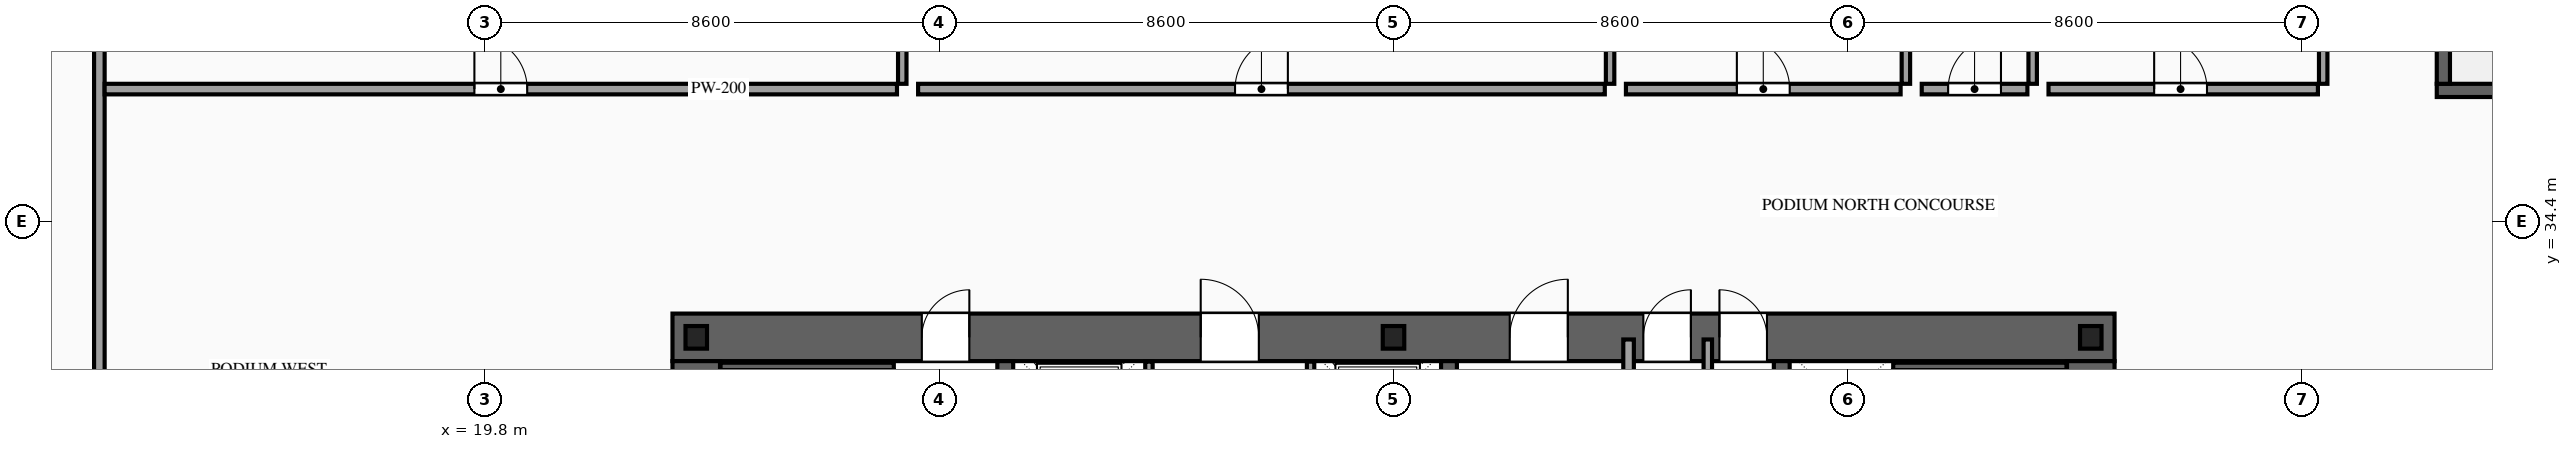
"""IFC4 building model, lengths in metres.
Left out: names, types, materials, properties, quantities, classifications, styles, units other than length and angle.
Written with IfcOpenShell. Run it as: python <this file> out.ifc"""

import sys

from ifc_helpers import new_model, si_unit, direction, frame, frame_2d, origin, origin_2d, place, context, subcontext, project, spatial, rectangle, i_section, extrude, source, transform, mapped, element, fill, save


model = new_model("IFC4")
c1 = context("Model", 3, precision=1e-05, world=origin(), true_north=direction((0.0, 1.0)))
c2 = subcontext(c1, "Body", "Model", "MODEL_VIEW")
j1 = project(units=[si_unit("LENGTHUNIT", "METRE"), si_unit("PLANEANGLEUNIT", "RADIAN")], contexts=[c1])
p1 = place(None, origin())
s1 = spatial("IfcSite", under=j1, at=p1, CompositionType="ELEMENT")
p2 = place(p1, origin())
s2 = spatial("IfcBuilding", under=s1, at=p2, CompositionType="ELEMENT")
p3 = place(p2, frame((0.0, 0.0, 5.4)))
s3 = spatial("IfcBuildingStorey", under=s2, at=p3, CompositionType="ELEMENT", Elevation=5.4)
p4 = place(p3, frame((23.35, 32.2, 0.0), z_axis=(0.0, 0.0, 1.0), x_axis=(1.0, 0.0, 0.0)))
e1 = element("IfcWall", 1, at=p4, inside=s3, PredefinedType="SHEAR", context=c2, shape_type="SweptSolid", body=[
    extrude(rectangle(XDim=27.3, YDim=0.9, at=frame_2d((13.65, 0.0))), origin(), (0.0, 0.0, 1.0), 4.8),
])
p5 = place(p4, frame((4.72, 0.0, 0.0)))
e2 = element("IfcOpeningElement", 2, at=p5, cuts=e1, PredefinedType="OPENING", context=c2, shape_type="SweptSolid", body=[
    extrude(rectangle(XDim=0.9, YDim=2.15, at=frame_2d((0.45, 1.075))), frame((0.0, 0.465, 0.0), z_axis=(0.0, -1.0, 0.0), x_axis=(1.0, 0.0, 0.0)), (0.0, 0.0, 1.0), 0.93),
])
p6 = place(p4, frame((10.0, 0.0, 0.0)))
e3 = element("IfcOpeningElement", 3, at=p6, cuts=e1, PredefinedType="OPENING", context=c2, shape_type="SweptSolid", body=[
    extrude(rectangle(XDim=1.1, YDim=2.2, at=frame_2d((0.55, 1.1))), frame((0.0, 0.465, 0.0), z_axis=(0.0, -1.0, 0.0), x_axis=(1.0, 0.0, 0.0)), (0.0, 0.0, 1.0), 0.93),
])
p7 = place(p4, frame((15.85, 0.0, 0.0)))
e4 = element("IfcOpeningElement", 4, at=p7, cuts=e1, PredefinedType="OPENING", context=c2, shape_type="SweptSolid", body=[
    extrude(rectangle(XDim=1.1, YDim=2.2, at=frame_2d((0.55, 1.1))), frame((0.0, 0.465, 0.0), z_axis=(0.0, -1.0, 0.0), x_axis=(1.0, 0.0, 0.0)), (0.0, 0.0, 1.0), 0.93),
])
p8 = place(p4, frame((18.38, 0.0, 0.0)))
e5 = element("IfcOpeningElement", 5, at=p8, cuts=e1, PredefinedType="OPENING", context=c2, shape_type="SweptSolid", body=[
    extrude(rectangle(XDim=0.9, YDim=2.15, at=frame_2d((0.45, 1.075))), frame((0.0, 0.465, 0.0), z_axis=(0.0, -1.0, 0.0), x_axis=(1.0, 0.0, 0.0)), (0.0, 0.0, 1.0), 0.93),
])
p9 = place(p4, frame((19.82, 0.0, 0.0)))
e6 = element("IfcOpeningElement", 6, at=p9, cuts=e1, PredefinedType="OPENING", context=c2, shape_type="SweptSolid", body=[
    extrude(rectangle(XDim=0.9, YDim=2.15, at=frame_2d((0.45, 1.075))), frame((0.0, 0.465, 0.0), z_axis=(0.0, -1.0, 0.0), x_axis=(1.0, 0.0, 0.0)), (0.0, 0.0, 1.0), 0.93),
])
m1 = source(origin(), c2, "Body", "SweptSolid", [
    extrude(rectangle(XDim=11.9, YDim=0.9, at=frame_2d((5.95, 0.0))), origin(), (0.0, 0.0, 1.0), 4.8),
])
for number, where, z_axis, x_axis in (
    (7, (23.8, 19.85, 0.0), (0.0, 0.0, 1.0), (0.0, 1.0, 0.0)),
    (8, (50.2, 19.85, 0.0), (0.0, 0.0, 1.0), (0.0, 1.0, 0.0)),
):
    element("IfcWall", number, at=place(p3, frame(where, z_axis=z_axis, x_axis=x_axis)), inside=s3, PredefinedType="SHEAR", context=c2, shape_type="MappedRepresentation", body=[
        mapped(m1, transform((0.0, 0.0, 0.0), scale=1.0)),
    ])
m2 = source(origin(), c2, "Body", "SweptSolid", [
    extrude(rectangle(XDim=11.9, YDim=0.3, at=frame_2d((5.95, 0.0))), origin(), (0.0, 0.0, 1.0), 4.8),
])
for number, where, z_axis, x_axis in (
    (9, (29.65, 19.85, 0.0), (0.0, 0.0, 1.0), (0.0, 1.0, 0.0)),
    (10, (38.05, 19.85, 0.0), (0.0, 0.0, 1.0), (0.0, 1.0, 0.0)),
    (11, (44.35, 19.85, 0.0), (0.0, 0.0, 1.0), (0.0, 1.0, 0.0)),
):
    element("IfcWall", number, at=place(p3, frame(where, z_axis=z_axis, x_axis=x_axis)), inside=s3, PredefinedType="SOLIDWALL", context=c2, shape_type="MappedRepresentation", body=[
        mapped(m2, transform((0.0, 0.0, 0.0), scale=1.0)),
    ])
m3 = source(origin(), c2, "Body", "SweptSolid", [
    extrude(i_section(OverallWidth=0.407, OverallDepth=0.428, WebThickness=0.02, FlangeThickness=0.035, at=origin_2d()), origin(), (0.0, 0.0, 1.0), 4.8),
])
for number, where, z_axis, x_axis in (
    (12, (23.8, 32.2, 0.0), (0.0, 0.0, 1.0), (1.0, 0.0, 0.0)),
    (13, (37.0, 32.2, 0.0), (0.0, 0.0, 1.0), (1.0, 0.0, 0.0)),
    (14, (50.2, 32.2, 0.0), (0.0, 0.0, 1.0), (1.0, 0.0, 0.0)),
):
    element("IfcColumn", number, at=place(p3, frame(where, z_axis=z_axis, x_axis=x_axis)), inside=s3, PredefinedType="COLUMN", context=c2, shape_type="MappedRepresentation", body=[
        mapped(m3, transform((0.0, 0.0, 0.0), scale=1.0)),
    ])
p10 = place(p3, frame((32.37, 29.4, 0.0), z_axis=(0.0, 0.0, 1.0), x_axis=(0.0, 1.0, 0.0)))
e15 = element("IfcWall", 15, at=p10, inside=s3, PredefinedType="SOLIDWALL", context=c2, shape_type="SweptSolid", body=[
    extrude(rectangle(XDim=2.34, YDim=0.14, at=frame_2d((1.17, 0.0))), origin(), (0.0, 0.0, 1.0), 4.52),
])
p11 = place(p10, frame((0.62, 0.0, 0.0)))
e16 = element("IfcOpeningElement", 16, at=p11, cuts=e15, PredefinedType="OPENING", context=c2, shape_type="SweptSolid", body=[
    extrude(rectangle(XDim=1.1, YDim=2.2, at=frame_2d((0.55, 1.1))), frame((0.0, 0.085, 0.0), z_axis=(0.0, -1.0, 0.0), x_axis=(1.0, 0.0, 0.0)), (0.0, 0.0, 1.0), 0.17),
])
p12 = place(p3, frame((35.43, 29.4, 0.0), z_axis=(0.0, 0.0, 1.0), x_axis=(0.0, 1.0, 0.0)))
e17 = element("IfcWall", 17, at=p12, inside=s3, PredefinedType="SOLIDWALL", context=c2, shape_type="SweptSolid", body=[
    extrude(rectangle(XDim=2.34, YDim=0.14, at=frame_2d((1.17, 0.0))), origin(), (0.0, 0.0, 1.0), 4.52),
])
p13 = place(p12, frame((0.62, 0.0, 0.0)))
e18 = element("IfcOpeningElement", 18, at=p13, cuts=e17, PredefinedType="OPENING", context=c2, shape_type="SweptSolid", body=[
    extrude(rectangle(XDim=1.1, YDim=2.2, at=frame_2d((0.55, 1.1))), frame((0.0, 0.085, 0.0), z_axis=(0.0, -1.0, 0.0), x_axis=(1.0, 0.0, 0.0)), (0.0, 0.0, 1.0), 0.17),
])
m4 = source(origin(), c2, "Body", "SweptSolid", [
    extrude(rectangle(XDim=3.28, YDim=0.14, at=frame_2d((1.64, 0.0))), origin(), (0.0, 0.0, 1.0), 4.52),
])
for number, where, z_axis, x_axis in (
    (19, (24.26, 31.65, 0.0), (0.0, 0.0, 1.0), (1.0, 0.0, 0.0)),
    (20, (46.46, 31.65, 0.0), (0.0, 0.0, 1.0), (1.0, 0.0, 0.0)),
):
    element("IfcWall", number, at=place(p3, frame(where, z_axis=z_axis, x_axis=x_axis)), inside=s3, PredefinedType="SOLIDWALL", context=c2, shape_type="MappedRepresentation", body=[
        mapped(m4, transform((0.0, 0.0, 0.0), scale=1.0)),
    ])
m5 = source(origin(), c2, "Body", "SweptSolid", [
    extrude(rectangle(XDim=4.3, YDim=0.25, at=frame_2d((2.15, 0.0))), origin(), (0.0, 0.0, 1.0), 4.52),
])
p14 = place(p3, frame((56.75, 36.875, 0.0), z_axis=(0.0, 0.0, 1.0), x_axis=(1.0, 0.0, 0.0)))
e21 = element("IfcWall", 21, at=p14, inside=s3, PredefinedType="SOLIDWALL", context=c2, shape_type="MappedRepresentation", body=[
    mapped(m5, transform((0.0, 0.0, 0.0), scale=1.0)),
])
p15 = place(p3, frame((56.875, 37.0, 0.0), z_axis=(0.0, 0.0, 1.0), x_axis=(0.0, 1.0, 0.0)))
e22 = element("IfcWall", 22, at=p15, inside=s3, PredefinedType="SOLIDWALL", context=c2, shape_type="SweptSolid", body=[
    extrude(rectangle(XDim=9.6, YDim=0.25, at=frame_2d((4.8, 0.0))), origin(), (0.0, 0.0, 1.0), 4.52),
])
p16 = place(p15, frame((8.15, 0.0, 0.0)))
e23 = element("IfcOpeningElement", 23, at=p16, cuts=e22, PredefinedType="OPENING", context=c2, shape_type="SweptSolid", body=[
    extrude(rectangle(XDim=1.1, YDim=2.2, at=frame_2d((0.55, 1.1))), frame((0.0, 0.14, 0.0), z_axis=(0.0, -1.0, 0.0), x_axis=(1.0, 0.0, 0.0)), (0.0, 0.0, 1.0), 0.28),
])
m6 = source(origin(), c2, "Body", "SweptSolid", [
    extrude(rectangle(XDim=5.96, YDim=0.2, at=frame_2d((2.98, 0.0))), origin(), (0.0, 0.0, 1.0), 4.52),
])
p17 = place(p3, frame((41.45, 26.2, 0.0), z_axis=(0.0, 0.0, 1.0), x_axis=(0.0, 1.0, 0.0)))
e24 = element("IfcWall", 24, at=p17, inside=s3, PredefinedType="PARTITIONING", context=c2, shape_type="MappedRepresentation", body=[
    mapped(m6, transform((0.0, 0.0, 0.0), scale=1.0)),
])
m7 = source(origin(), c2, "Body", "SweptSolid", [
    extrude(rectangle(XDim=5.96, YDim=0.16, at=frame_2d((2.98, 0.0))), origin(), (0.0, 0.0, 1.0), 4.52),
])
p18 = place(p3, frame((42.95, 26.2, 0.0), z_axis=(0.0, 0.0, 1.0), x_axis=(0.0, 1.0, 0.0)))
e25 = element("IfcWall", 25, at=p18, inside=s3, PredefinedType="PARTITIONING", context=c2, shape_type="MappedRepresentation", body=[
    mapped(m7, transform((0.0, 0.0, 0.0), scale=1.0)),
])
p19 = place(p3, frame((12.5, 24.8, 0.0), z_axis=(0.0, 0.0, 1.0), x_axis=(0.0, 1.0, 0.0)))
e26 = element("IfcWall", 26, at=p19, inside=s3, PredefinedType="PARTITIONING", context=c2, shape_type="SweptSolid", body=[
    extrude(rectangle(XDim=24.82, YDim=0.2, at=frame_2d((12.41, 0.0))), origin(), (0.0, 0.0, 1.0), 4.52),
])
p20 = place(p19, frame((4.9, 0.0, 0.0)))
e27 = element("IfcOpeningElement", 27, at=p20, cuts=e26, PredefinedType="OPENING", context=c2, shape_type="SweptSolid", body=[
    extrude(rectangle(XDim=1.0, YDim=2.2, at=frame_2d((0.5, 1.1))), frame((0.0, 0.115, 0.0), z_axis=(0.0, -1.0, 0.0), x_axis=(1.0, 0.0, 0.0)), (0.0, 0.0, 1.0), 0.23),
])
p21 = place(p3, frame((12.6, 36.9, 0.0), z_axis=(0.0, 0.0, 1.0), x_axis=(1.0, 0.0, 0.0)))
e28 = element("IfcWall", 28, at=p21, inside=s3, PredefinedType="PARTITIONING", context=c2, shape_type="SweptSolid", body=[
    extrude(rectangle(XDim=15.0, YDim=0.2, at=frame_2d((7.5, 0.0))), origin(), (0.0, 0.0, 1.0), 4.52),
])
p22 = place(p21, frame((7.0, 0.0, 0.0)))
e29 = element("IfcOpeningElement", 29, at=p22, cuts=e28, PredefinedType="OPENING", context=c2, shape_type="SweptSolid", body=[
    extrude(rectangle(XDim=1.0, YDim=2.2, at=frame_2d((0.5, 1.1))), frame((0.0, 0.115, 0.0), z_axis=(0.0, -1.0, 0.0), x_axis=(1.0, 0.0, 0.0)), (0.0, 0.0, 1.0), 0.23),
])
m8 = source(origin(), c2, "Body", "SweptSolid", [
    extrude(rectangle(XDim=12.62, YDim=0.16, at=frame_2d((6.31, 0.0))), origin(), (0.0, 0.0, 1.0), 4.52),
])
p23 = place(p3, frame((27.7, 37.0, 0.0), z_axis=(0.0, 0.0, 1.0), x_axis=(0.0, 1.0, 0.0)))
e30 = element("IfcWall", 30, at=p23, inside=s3, PredefinedType="PARTITIONING", context=c2, shape_type="MappedRepresentation", body=[
    mapped(m8, transform((0.0, 0.0, 0.0), scale=1.0)),
])
p24 = place(p3, frame((28.0, 36.9, 0.0), z_axis=(0.0, 0.0, 1.0), x_axis=(1.0, 0.0, 0.0)))
e31 = element("IfcWall", 31, at=p24, inside=s3, PredefinedType="PARTITIONING", context=c2, shape_type="SweptSolid", body=[
    extrude(rectangle(XDim=13.0, YDim=0.2, at=frame_2d((6.5, 0.0))), origin(), (0.0, 0.0, 1.0), 4.52),
])
p25 = place(p24, frame((6.0, 0.0, 0.0)))
e32 = element("IfcOpeningElement", 32, at=p25, cuts=e31, PredefinedType="OPENING", context=c2, shape_type="SweptSolid", body=[
    extrude(rectangle(XDim=1.0, YDim=2.2, at=frame_2d((0.5, 1.1))), frame((0.0, 0.115, 0.0), z_axis=(0.0, -1.0, 0.0), x_axis=(1.0, 0.0, 0.0)), (0.0, 0.0, 1.0), 0.23),
])
p26 = place(p3, frame((41.1, 37.0, 0.0), z_axis=(0.0, 0.0, 1.0), x_axis=(0.0, 1.0, 0.0)))
e33 = element("IfcWall", 33, at=p26, inside=s3, PredefinedType="PARTITIONING", context=c2, shape_type="MappedRepresentation", body=[
    mapped(m8, transform((0.0, 0.0, 0.0), scale=1.0)),
])
p27 = place(p3, frame((41.4, 36.9, 0.0), z_axis=(0.0, 0.0, 1.0), x_axis=(1.0, 0.0, 0.0)))
e34 = element("IfcWall", 34, at=p27, inside=s3, PredefinedType="PARTITIONING", context=c2, shape_type="SweptSolid", body=[
    extrude(rectangle(XDim=5.2, YDim=0.2, at=frame_2d((2.6, 0.0))), origin(), (0.0, 0.0, 1.0), 4.52),
])
p28 = place(p27, frame((2.1, 0.0, 0.0)))
e35 = element("IfcOpeningElement", 35, at=p28, cuts=e34, PredefinedType="OPENING", context=c2, shape_type="SweptSolid", body=[
    extrude(rectangle(XDim=1.0, YDim=2.2, at=frame_2d((0.5, 1.1))), frame((0.0, 0.115, 0.0), z_axis=(0.0, -1.0, 0.0), x_axis=(1.0, 0.0, 0.0)), (0.0, 0.0, 1.0), 0.23),
])
p29 = place(p3, frame((46.7, 37.0, 0.0), z_axis=(0.0, 0.0, 1.0), x_axis=(0.0, 1.0, 0.0)))
e36 = element("IfcWall", 36, at=p29, inside=s3, PredefinedType="PARTITIONING", context=c2, shape_type="MappedRepresentation", body=[
    mapped(m8, transform((0.0, 0.0, 0.0), scale=1.0)),
])
p30 = place(p3, frame((47.0, 36.9, 0.0), z_axis=(0.0, 0.0, 1.0), x_axis=(1.0, 0.0, 0.0)))
e37 = element("IfcWall", 37, at=p30, inside=s3, PredefinedType="PARTITIONING", context=c2, shape_type="SweptSolid", body=[
    extrude(rectangle(XDim=2.0, YDim=0.2, at=frame_2d((1.0, 0.0))), origin(), (0.0, 0.0, 1.0), 4.52),
])
p31 = place(p30, frame((0.5, 0.0, 0.0)))
e38 = element("IfcOpeningElement", 38, at=p31, cuts=e37, PredefinedType="OPENING", context=c2, shape_type="SweptSolid", body=[
    extrude(rectangle(XDim=1.0, YDim=2.2, at=frame_2d((0.5, 1.1))), frame((0.0, 0.115, 0.0), z_axis=(0.0, -1.0, 0.0), x_axis=(1.0, 0.0, 0.0)), (0.0, 0.0, 1.0), 0.23),
])
p32 = place(p3, frame((49.1, 37.0, 0.0), z_axis=(0.0, 0.0, 1.0), x_axis=(0.0, 1.0, 0.0)))
e39 = element("IfcWall", 39, at=p32, inside=s3, PredefinedType="PARTITIONING", context=c2, shape_type="MappedRepresentation", body=[
    mapped(m8, transform((0.0, 0.0, 0.0), scale=1.0)),
])
p33 = place(p3, frame((49.4, 36.9, 0.0), z_axis=(0.0, 0.0, 1.0), x_axis=(1.0, 0.0, 0.0)))
e40 = element("IfcWall", 40, at=p33, inside=s3, PredefinedType="PARTITIONING", context=c2, shape_type="SweptSolid", body=[
    extrude(rectangle(XDim=5.1, YDim=0.2, at=frame_2d((2.55, 0.0))), origin(), (0.0, 0.0, 1.0), 4.52),
])
p34 = place(p33, frame((2.0, 0.0, 0.0)))
e41 = element("IfcOpeningElement", 41, at=p34, cuts=e40, PredefinedType="OPENING", context=c2, shape_type="SweptSolid", body=[
    extrude(rectangle(XDim=1.0, YDim=2.2, at=frame_2d((0.5, 1.1))), frame((0.0, 0.115, 0.0), z_axis=(0.0, -1.0, 0.0), x_axis=(1.0, 0.0, 0.0)), (0.0, 0.0, 1.0), 0.23),
])
p35 = place(p3, frame((54.6, 37.0, 0.0), z_axis=(0.0, 0.0, 1.0), x_axis=(0.0, 1.0, 0.0)))
e42 = element("IfcWall", 42, at=p35, inside=s3, PredefinedType="PARTITIONING", context=c2, shape_type="MappedRepresentation", body=[
    mapped(m8, transform((0.0, 0.0, 0.0), scale=1.0)),
])
m9 = source(origin(), c2, "Body", "SweptSolid", [
    extrude(rectangle(XDim=0.9, YDim=2.15, at=frame_2d((0.45, 1.075))), frame((0.0, 0.025, 0.0), z_axis=(0.0, -1.0, 0.0), x_axis=(1.0, 0.0, 0.0)), (0.0, 0.0, 1.0), 0.05),
])
p36 = place(p5, origin())
e43 = element("IfcDoor", 43, at=p36, inside=s3, OperationType="SINGLE_SWING_RIGHT", PredefinedType="DOOR", context=c2, shape_type="MappedRepresentation", body=[
    mapped(m9, transform((0.0, 0.0, 0.0), scale=1.0)),
])
fill(e2, e43)
m10 = source(origin(), c2, "Body", "SweptSolid", [
    extrude(rectangle(XDim=1.1, YDim=2.2, at=frame_2d((0.55, 1.1))), frame((0.0, 0.025, 0.0), z_axis=(0.0, -1.0, 0.0), x_axis=(1.0, 0.0, 0.0)), (0.0, 0.0, 1.0), 0.05),
])
p37 = place(p6, origin())
e44 = element("IfcDoor", 44, at=p37, inside=s3, OperationType="SINGLE_SWING_LEFT", PredefinedType="DOOR", context=c2, shape_type="MappedRepresentation", body=[
    mapped(m10, transform((0.0, 0.0, 0.0), scale=1.0)),
])
fill(e3, e44)
p38 = place(p7, origin())
e45 = element("IfcDoor", 45, at=p38, inside=s3, OperationType="SINGLE_SWING_RIGHT", PredefinedType="DOOR", context=c2, shape_type="MappedRepresentation", body=[
    mapped(m10, transform((0.0, 0.0, 0.0), scale=1.0)),
])
fill(e4, e45)
p39 = place(p8, origin())
e46 = element("IfcDoor", 46, at=p39, inside=s3, OperationType="SINGLE_SWING_RIGHT", PredefinedType="DOOR", context=c2, shape_type="MappedRepresentation", body=[
    mapped(m9, transform((0.0, 0.0, 0.0), scale=1.0)),
])
fill(e5, e46)
p40 = place(p9, origin())
e47 = element("IfcDoor", 47, at=p40, inside=s3, OperationType="SINGLE_SWING_LEFT", PredefinedType="DOOR", context=c2, shape_type="MappedRepresentation", body=[
    mapped(m9, transform((0.0, 0.0, 0.0), scale=1.0)),
])
fill(e6, e47)
m11 = source(origin(), c2, "Body", "SweptSolid", [
    extrude(rectangle(XDim=1.0, YDim=2.2, at=frame_2d((0.5, 1.1))), frame((0.0, 0.025, 0.0), z_axis=(0.0, -1.0, 0.0), x_axis=(1.0, 0.0, 0.0)), (0.0, 0.0, 1.0), 0.05),
])
p41 = place(p22, origin())
e48 = element("IfcDoor", 48, at=p41, inside=s3, OperationType="SINGLE_SWING_LEFT", PredefinedType="DOOR", context=c2, shape_type="MappedRepresentation", body=[
    mapped(m11, transform((0.0, 0.0, 0.0), scale=1.0)),
])
fill(e29, e48)
p42 = place(p25, origin())
e49 = element("IfcDoor", 49, at=p42, inside=s3, OperationType="SINGLE_SWING_RIGHT", PredefinedType="DOOR", context=c2, shape_type="MappedRepresentation", body=[
    mapped(m11, transform((0.0, 0.0, 0.0), scale=1.0)),
])
fill(e32, e49)
p43 = place(p28, origin())
e50 = element("IfcDoor", 50, at=p43, inside=s3, OperationType="SINGLE_SWING_LEFT", PredefinedType="DOOR", context=c2, shape_type="MappedRepresentation", body=[
    mapped(m11, transform((0.0, 0.0, 0.0), scale=1.0)),
])
fill(e35, e50)
p44 = place(p31, origin())
e51 = element("IfcDoor", 51, at=p44, inside=s3, OperationType="SINGLE_SWING_RIGHT", PredefinedType="DOOR", context=c2, shape_type="MappedRepresentation", body=[
    mapped(m11, transform((0.0, 0.0, 0.0), scale=1.0)),
])
fill(e38, e51)
p45 = place(p34, origin())
e52 = element("IfcDoor", 52, at=p45, inside=s3, OperationType="SINGLE_SWING_LEFT", PredefinedType="DOOR", context=c2, shape_type="MappedRepresentation", body=[
    mapped(m11, transform((0.0, 0.0, 0.0), scale=1.0)),
])
fill(e41, e52)
save(model, sys.argv[1])
